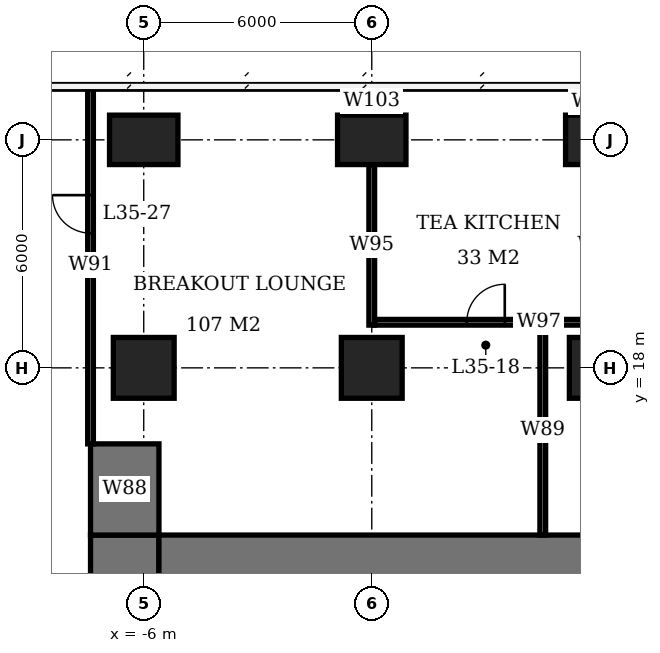
"""IFC4 building model, lengths in metres.
Left out: names, types, materials, properties, quantities, classifications, styles, units other than length and angle.
Written with IfcOpenShell. Run it as: python <this file> out.ifc"""

import sys

from ifc_helpers import new_model, si_unit, direction, frame, frame_2d, origin, origin_2d, place, context, subcontext, project, spatial, rectangle, extrude, element, fill, save


model = new_model("IFC4")
c1 = context("Model", 3, precision=1e-05, world=origin(), true_north=direction((0.0, 1.0)))
c2 = subcontext(c1, "Body", "Model", "MODEL_VIEW")
j1 = project(units=[si_unit("LENGTHUNIT", "METRE"), si_unit("PLANEANGLEUNIT", "RADIAN")], contexts=[c1])
p1 = place(None, origin())
s1 = spatial("IfcSite", under=j1, at=p1, CompositionType="ELEMENT")
p2 = place(p1, origin())
s2 = spatial("IfcBuilding", under=s1, at=p2, CompositionType="ELEMENT")
p3 = place(p2, frame((0.0, 0.0, 144.5)))
s3 = spatial("IfcBuildingStorey", under=s2, at=p3, CompositionType="ELEMENT", Elevation=144.5)
p4 = place(p3, frame((-6.0, 18.0, 0.0), z_axis=(0.0, 0.0, 1.0), x_axis=(1.0, 0.0, 0.0)))
e1 = element("IfcColumn", 1, at=p4, inside=s3, PredefinedType="COLUMN", context=c2, shape_type="SweptSolid", body=[
    extrude(rectangle(XDim=1.6, YDim=1.6, at=origin_2d()), origin(), (0.0, 0.0, 1.0), 3.9),
])
p5 = place(p3, frame((-6.0, 24.0, 0.0), z_axis=(0.0, 0.0, 1.0), x_axis=(1.0, 0.0, 0.0)))
e2 = element("IfcColumn", 2, at=p5, inside=s3, PredefinedType="COLUMN", context=c2, shape_type="SweptSolid", body=[
    extrude(rectangle(XDim=1.8, YDim=1.3, at=origin_2d()), origin(), (0.0, 0.0, 1.0), 3.9),
])
p6 = place(p3, frame((0.0, 18.0, 0.0), z_axis=(0.0, 0.0, 1.0), x_axis=(1.0, 0.0, 0.0)))
e3 = element("IfcColumn", 3, at=p6, inside=s3, PredefinedType="COLUMN", context=c2, shape_type="SweptSolid", body=[
    extrude(rectangle(XDim=1.6, YDim=1.6, at=origin_2d()), origin(), (0.0, 0.0, 1.0), 3.9),
])
p7 = place(p3, frame((0.0, 24.0, 0.0), z_axis=(0.0, 0.0, 1.0), x_axis=(1.0, 0.0, 0.0)))
e4 = element("IfcColumn", 4, at=p7, inside=s3, PredefinedType="COLUMN", context=c2, shape_type="SweptSolid", body=[
    extrude(rectangle(XDim=1.8, YDim=1.3, at=origin_2d()), origin(), (0.0, 0.0, 1.0), 3.9),
])
p8 = place(p3, frame((6.0, 18.0, 0.0), z_axis=(0.0, 0.0, 1.0), x_axis=(1.0, 0.0, 0.0)))
e5 = element("IfcColumn", 5, at=p8, inside=s3, PredefinedType="COLUMN", context=c2, shape_type="SweptSolid", body=[
    extrude(rectangle(XDim=1.6, YDim=1.6, at=origin_2d()), origin(), (0.0, 0.0, 1.0), 3.9),
])
p9 = place(p3, frame((6.0, 24.0, 0.0), z_axis=(0.0, 0.0, 1.0), x_axis=(1.0, 0.0, 0.0)))
e6 = element("IfcColumn", 6, at=p9, inside=s3, PredefinedType="COLUMN", context=c2, shape_type="SweptSolid", body=[
    extrude(rectangle(XDim=1.8, YDim=1.3, at=origin_2d()), origin(), (0.0, 0.0, 1.0), 3.9),
])
p10 = place(p3, frame((-5.6, 12.6, 0.0), z_axis=(0.0, 0.0, 1.0), x_axis=(1.0, 0.0, 0.0)))
e7 = element("IfcWall", 7, at=p10, inside=s3, PredefinedType="SHEAR", context=c2, shape_type="SweptSolid", body=[
    extrude(rectangle(XDim=23.2, YDim=2.0, at=frame_2d((11.6, 0.0))), origin(), (0.0, 0.0, 1.0), 3.9),
])
p11 = place(p3, frame((-6.5, -7.6, 0.0), z_axis=(0.0, 0.0, 1.0), x_axis=(0.0, 1.0, 0.0)))
e8 = element("IfcWall", 8, at=p11, inside=s3, PredefinedType="SHEAR", context=c2, shape_type="SweptSolid", body=[
    extrude(rectangle(XDim=21.2, YDim=1.8, at=frame_2d((10.6, 0.0))), origin(), (0.0, 0.0, 1.0), 3.9),
])
p12 = place(p11, frame((7.8, 0.0, 0.0)))
e9 = element("IfcOpeningElement", 9, at=p12, cuts=e8, PredefinedType="OPENING", context=c2, shape_type="SweptSolid", body=[
    extrude(rectangle(XDim=1.8, YDim=2.4, at=frame_2d((0.9, 1.2))), frame((0.0, 0.91, 0.0), z_axis=(0.0, -1.0, 0.0), x_axis=(1.0, 0.0, 0.0)), (0.0, 0.0, 1.0), 1.82),
])
p13 = place(p3, frame((-6.5, 13.6, 0.0), z_axis=(0.0, 0.0, 1.0), x_axis=(0.0, 1.0, 0.0)))
e10 = element("IfcWall", 10, at=p13, inside=s3, PredefinedType="SHEAR", context=c2, shape_type="SweptSolid", body=[
    extrude(rectangle(XDim=2.4, YDim=1.8, at=frame_2d((1.2, 0.0))), origin(), (0.0, 0.0, 1.0), 3.9),
])
p14 = place(p3, frame((0.075, 19.2, 0.0), z_axis=(0.0, 0.0, 1.0), x_axis=(1.0, 0.0, 0.0)))
e11 = element("IfcWall", 11, at=p14, inside=s3, PredefinedType="PARTITIONING", context=c2, shape_type="SweptSolid", body=[
    extrude(rectangle(XDim=5.85, YDim=0.15, at=frame_2d((2.925, 0.0))), origin(), (0.0, 0.0, 1.0), 3.65),
])
p15 = place(p14, frame((2.425, 0.0, 0.0)))
e12 = element("IfcOpeningElement", 12, at=p15, cuts=e11, PredefinedType="OPENING", context=c2, shape_type="SweptSolid", body=[
    extrude(rectangle(XDim=1.0, YDim=2.1, at=frame_2d((0.5, 1.05))), frame((0.0, 0.085, 0.0), z_axis=(0.0, -1.0, 0.0), x_axis=(1.0, 0.0, 0.0)), (0.0, 0.0, 1.0), 0.17),
])
p16 = place(p3, frame((0.0, 19.125, 0.0), z_axis=(0.0, 0.0, 1.0), x_axis=(0.0, 1.0, 0.0)))
e13 = element("IfcWall", 13, at=p16, inside=s3, PredefinedType="PARTITIONING", context=c2, shape_type="SweptSolid", body=[
    extrude(rectangle(XDim=4.225, YDim=0.15, at=frame_2d((2.113, 0.0))), origin(), (0.0, 0.0, 1.0), 3.65),
])
p17 = place(p3, frame((0.0, 24.65, 0.0), z_axis=(0.0, 0.0, 1.0), x_axis=(0.0, 1.0, 0.0)))
e14 = element("IfcWall", 14, at=p17, inside=s3, PredefinedType="PARTITIONING", context=c2, shape_type="SweptSolid", body=[
    extrude(rectangle(XDim=0.75, YDim=0.15, at=frame_2d((0.375, 0.0))), origin(), (0.0, 0.0, 1.0), 3.65),
])
p18 = place(p3, frame((-7.4, 16.0, 0.0), z_axis=(0.0, 0.0, 1.0), x_axis=(0.0, 1.0, 0.0)))
e15 = element("IfcWall", 15, at=p18, inside=s3, PredefinedType="PARTITIONING", context=c2, shape_type="SweptSolid", body=[
    extrude(rectangle(XDim=9.4, YDim=0.15, at=frame_2d((4.7, 0.0))), origin(), (0.0, 0.0, 1.0), 3.65),
])
p19 = place(p18, frame((5.545, 0.0, 0.0)))
e16 = element("IfcOpeningElement", 16, at=p19, cuts=e15, PredefinedType="OPENING", context=c2, shape_type="SweptSolid", body=[
    extrude(rectangle(XDim=1.0, YDim=2.1, at=frame_2d((0.5, 1.05))), frame((0.0, 0.085, 0.0), z_axis=(0.0, -1.0, 0.0), x_axis=(1.0, 0.0, 0.0)), (0.0, 0.0, 1.0), 0.17),
])
p20 = place(p3, frame((4.5, 13.6, 0.0), z_axis=(0.0, 0.0, 1.0), x_axis=(0.0, 1.0, 0.0)))
e17 = element("IfcWall", 17, at=p20, inside=s3, PredefinedType="PARTITIONING", context=c2, shape_type="SweptSolid", body=[
    extrude(rectangle(XDim=5.525, YDim=0.15, at=frame_2d((2.762, 0.0))), origin(), (0.0, 0.0, 1.0), 3.65),
])
p21 = place(p15, origin())
e18 = element("IfcDoor", 18, at=p21, inside=s3, OperationType="SINGLE_SWING_RIGHT", PredefinedType="DOOR", context=c2, shape_type="SweptSolid", body=[
    extrude(rectangle(XDim=1.0, YDim=2.1, at=frame_2d((0.5, 1.05))), frame((0.0, 0.025, 0.0), z_axis=(0.0, -1.0, 0.0), x_axis=(1.0, 0.0, 0.0)), (0.0, 0.0, 1.0), 0.05),
])
fill(e12, e18)
p22 = place(p19, origin())
e19 = element("IfcDoor", 19, at=p22, inside=s3, OperationType="SINGLE_SWING_RIGHT", PredefinedType="DOOR", context=c2, shape_type="SweptSolid", body=[
    extrude(rectangle(XDim=1.0, YDim=2.1, at=frame_2d((0.5, 1.05))), frame((0.0, 0.025, 0.0), z_axis=(0.0, -1.0, 0.0), x_axis=(1.0, 0.0, 0.0)), (0.0, 0.0, 1.0), 0.05),
])
fill(e16, e19)
save(model, sys.argv[1])
